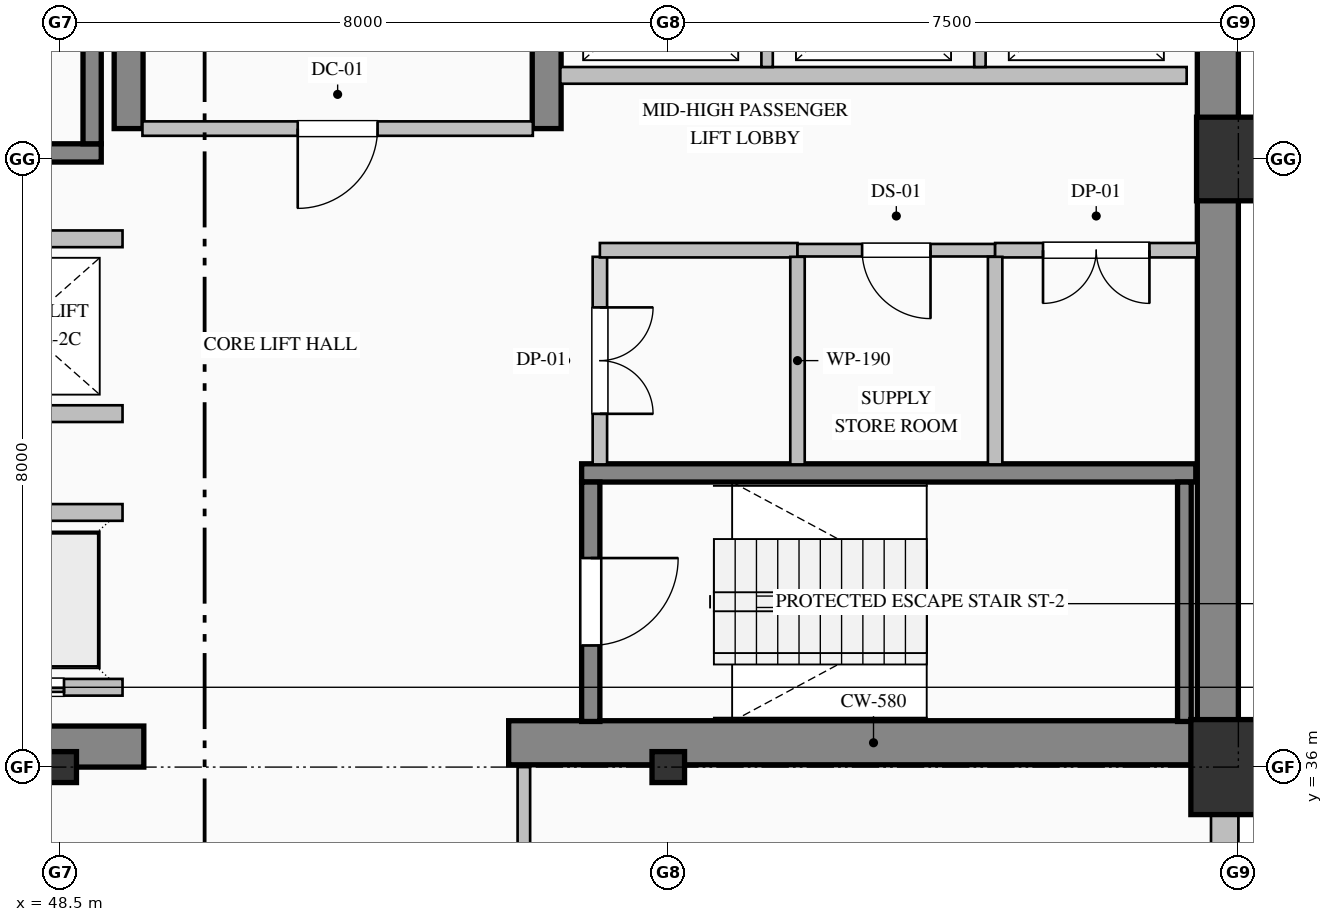
"""IFC4 building model, lengths in metres.
Left out: names, types, materials, properties, quantities, classifications, styles, units other than length and angle.
Written with IfcOpenShell. Run it as: python <this file> out.ifc"""

import sys

from ifc_helpers import new_model, si_unit, direction, frame, frame_2d, origin, origin_2d, place, context, subcontext, project, spatial, rectangle, hollow_rectangle, i_section, extrude, element, fill, save


model = new_model("IFC4")
c1 = context("Model", 3, precision=1e-05, world=origin(), true_north=direction((0.0, 1.0)))
c2 = subcontext(c1, "Body", "Model", "MODEL_VIEW")
j1 = project(units=[si_unit("LENGTHUNIT", "METRE"), si_unit("PLANEANGLEUNIT", "RADIAN")], contexts=[c1])
p1 = place(None, origin())
s1 = spatial("IfcSite", under=j1, at=p1, CompositionType="ELEMENT")
p2 = place(p1, origin())
s2 = spatial("IfcBuilding", under=s1, at=p2, CompositionType="ELEMENT")
p3 = place(p2, frame((0.0, 0.0, 92.2)))
s3 = spatial("IfcBuildingStorey", under=s2, at=p3, CompositionType="ELEMENT", Elevation=92.2)
p4 = place(p3, frame((63.73, 36.32, 0.0), z_axis=(0.0, 0.0, 1.0), x_axis=(0.0, 1.0, 0.0)))
e1 = element("IfcWall", 1, at=p4, inside=s3, PredefinedType="SHEAR", context=c2, shape_type="SweptSolid", body=[
    extrude(rectangle(XDim=15.14, YDim=0.54, at=frame_2d((7.57, 0.0))), origin(), (0.0, 0.0, 1.0), 3.75),
])
p5 = place(p3, frame((48.2, 36.27, 0.0), z_axis=(0.0, 0.0, 1.0), x_axis=(1.0, 0.0, 0.0)))
e2 = element("IfcWall", 2, at=p5, inside=s3, PredefinedType="SHEAR", context=c2, shape_type="SweptSolid", body=[
    extrude(rectangle(XDim=1.4, YDim=0.54, at=frame_2d((0.7, 0.0))), origin(), (0.0, 0.0, 1.0), 3.75),
])
p6 = place(p3, frame((54.4, 36.32, 0.0), z_axis=(0.0, 0.0, 1.0), x_axis=(1.0, 0.0, 0.0)))
e3 = element("IfcWall", 3, at=p6, inside=s3, PredefinedType="SHEAR", context=c2, shape_type="SweptSolid", body=[
    extrude(rectangle(XDim=9.6, YDim=0.58, at=frame_2d((4.8, 0.0))), origin(), (0.0, 0.0, 1.0), 4.0),
])
p7 = place(p3, frame((49.4, 44.4, 0.0), z_axis=(0.0, 0.0, 1.0), x_axis=(0.0, 1.0, 0.0)))
e4 = element("IfcWall", 4, at=p7, inside=s3, PredefinedType="SHEAR", context=c2, shape_type="SweptSolid", body=[
    extrude(rectangle(XDim=3.0, YDim=0.38, at=frame_2d((1.5, 0.0))), origin(), (0.0, 0.0, 1.0), 3.75),
])
p8 = place(p3, frame((54.9, 44.4, 0.0), z_axis=(0.0, 0.0, 1.0), x_axis=(0.0, 1.0, 0.0)))
e5 = element("IfcWall", 5, at=p8, inside=s3, PredefinedType="SHEAR", context=c2, shape_type="SweptSolid", body=[
    extrude(rectangle(XDim=7.06, YDim=0.38, at=frame_2d((3.53, 0.0))), origin(), (0.0, 0.0, 1.0), 3.75),
])
for number, where, z_axis, x_axis in (
    (6, (48.5, 36.0, 0.0), (0.0, 0.0, 1.0), (1.0, 0.0, 0.0)),
    (7, (56.5, 36.0, 0.0), (0.0, 0.0, 1.0), (1.0, 0.0, 0.0)),
):
    element("IfcColumn", number, at=place(p3, frame(where, z_axis=z_axis, x_axis=x_axis)), inside=s3, PredefinedType="COLUMN", context=c2, shape_type="SweptSolid", body=[
        extrude(i_section(OverallWidth=0.407, OverallDepth=0.428, WebThickness=0.02, FlangeThickness=0.035, FilletRadius=0.022, at=origin_2d()), origin(), (0.0, 0.0, 1.0), 4.0),
    ])
p9 = place(p3, frame((64.0, 36.0, 0.0), z_axis=(0.0, 0.0, 1.0), x_axis=(1.0, 0.0, 0.0)))
e8 = element("IfcColumn", 8, at=p9, inside=s3, PredefinedType="COLUMN", context=c2, shape_type="SweptSolid", body=[
    extrude(hollow_rectangle(XDim=1.25, YDim=1.25, WallThickness=0.045, at=origin_2d()), origin(), (0.0, 0.0, 1.0), 4.0),
])
p10 = place(p3, frame((64.0, 44.0, 0.0), z_axis=(0.0, 0.0, 1.0), x_axis=(1.0, 0.0, 0.0)))
e9 = element("IfcColumn", 9, at=p10, inside=s3, PredefinedType="COLUMN", context=c2, shape_type="SweptSolid", body=[
    extrude(hollow_rectangle(XDim=1.1, YDim=1.1, WallThickness=0.04, at=origin_2d()), origin(), (0.0, 0.0, 1.0), 4.0),
])
p11 = place(p3, frame((63.82, 36.05, 0.0), z_axis=(0.0, 0.0, 1.0), x_axis=(0.0, -1.0, 0.0)))
e10 = element("IfcWall", 10, at=p11, inside=s3, PredefinedType="SOLIDWALL", context=c2, shape_type="SweptSolid", body=[
    extrude(rectangle(XDim=28.05, YDim=0.36, at=frame_2d((14.025, 0.0))), origin(), (0.0, 0.0, 1.0), 3.25),
])
p12 = place(p11, frame((2.55, 0.0, 0.85)))
e11 = element("IfcOpeningElement", 11, at=p12, cuts=e10, PredefinedType="OPENING", context=c2, shape_type="SweptSolid", body=[
    extrude(rectangle(XDim=2.1, YDim=2.05, at=frame_2d((1.05, 1.025))), frame((0.0, 0.19, 0.0), z_axis=(0.0, -1.0, 0.0), x_axis=(1.0, 0.0, 0.0)), (0.0, 0.0, 1.0), 0.38),
])
p13 = place(p11, frame((13.35, 0.0, 0.85)))
e12 = element("IfcOpeningElement", 12, at=p13, cuts=e10, PredefinedType="OPENING", context=c2, shape_type="SweptSolid", body=[
    extrude(rectangle(XDim=2.1, YDim=2.05, at=frame_2d((1.05, 1.025))), frame((0.0, 0.19, 0.0), z_axis=(0.0, -1.0, 0.0), x_axis=(1.0, 0.0, 0.0)), (0.0, 0.0, 1.0), 0.38),
])
p14 = place(p3, frame((49.04, 44.08, 0.0), z_axis=(0.0, 0.0, 1.0), x_axis=(-1.0, 0.0, 0.0)))
e13 = element("IfcWall", 13, at=p14, inside=s3, PredefinedType="SOLIDWALL", context=c2, shape_type="SweptSolid", body=[
    extrude(rectangle(XDim=8.08, YDim=0.24, at=frame_2d((4.04, 0.0))), origin(), (0.0, 0.0, 1.0), 4.0),
])
p15 = place(p3, frame((48.92, 44.2, 0.0), z_axis=(0.0, 0.0, 1.0), x_axis=(0.0, 1.0, 0.0)))
e14 = element("IfcWall", 14, at=p15, inside=s3, PredefinedType="SOLIDWALL", context=c2, shape_type="SweptSolid", body=[
    extrude(rectangle(XDim=3.15, YDim=0.24, at=frame_2d((1.575, 0.0))), origin(), (0.0, 0.0, 1.0), 4.0),
])
p16 = place(p3, frame((55.36, 39.87, 0.0), z_axis=(0.0, 0.0, 1.0), x_axis=(1.0, 0.0, 0.0)))
e15 = element("IfcWall", 15, at=p16, inside=s3, PredefinedType="SOLIDWALL", context=c2, shape_type="SweptSolid", body=[
    extrude(rectangle(XDim=8.08, YDim=0.24, at=frame_2d((4.04, 0.0))), origin(), (0.0, 0.0, 1.0), 4.0),
])
p17 = place(p3, frame((55.48, 39.75, 0.0), z_axis=(0.0, 0.0, 1.0), x_axis=(0.0, -1.0, 0.0)))
e16 = element("IfcWall", 16, at=p17, inside=s3, PredefinedType="SOLIDWALL", context=c2, shape_type="SweptSolid", body=[
    extrude(rectangle(XDim=3.15, YDim=0.24, at=frame_2d((1.575, 0.0))), origin(), (0.0, 0.0, 1.0), 4.0),
])
p18 = place(p17, frame((1.0, 0.0, 0.0)))
e17 = element("IfcOpeningElement", 17, at=p18, cuts=e16, PredefinedType="OPENING", context=c2, shape_type="SweptSolid", body=[
    extrude(rectangle(XDim=1.15, YDim=2.2, at=frame_2d((0.575, 1.1))), frame((0.0, 0.13, 0.0), z_axis=(0.0, -1.0, 0.0), x_axis=(1.0, 0.0, 0.0)), (0.0, 0.0, 1.0), 0.26),
])
p19 = place(p3, frame((63.29, 36.6, 0.0), z_axis=(0.0, 0.0, 1.0), x_axis=(0.0, 1.0, 0.0)))
e18 = element("IfcWall", 18, at=p19, inside=s3, PredefinedType="SOLIDWALL", context=c2, shape_type="SweptSolid", body=[
    extrude(rectangle(XDim=3.15, YDim=0.18, at=frame_2d((1.575, 0.0))), origin(), (0.0, 0.0, 1.0), 4.0),
])
p20 = place(p3, frame((49.32, 37.05, 0.0), z_axis=(0.0, 0.0, 1.0), x_axis=(-1.0, 0.0, 0.0)))
e19 = element("IfcWall", 19, at=p20, inside=s3, PredefinedType="PARTITIONING", context=c2, shape_type="SweptSolid", body=[
    extrude(rectangle(XDim=8.24, YDim=0.22, at=frame_2d((4.12, 0.0))), origin(), (0.0, 0.0, 1.0), 3.75),
])
p21 = place(p20, frame((6.37, 0.0, 0.0)))
e20 = element("IfcOpeningElement", 20, at=p21, cuts=e19, PredefinedType="OPENING", context=c2, shape_type="SweptSolid", body=[
    extrude(rectangle(XDim=1.1, YDim=2.2, at=frame_2d((0.55, 1.1))), frame((0.0, 0.12, 0.0), z_axis=(0.0, -1.0, 0.0), x_axis=(1.0, 0.0, 0.0)), (0.0, 0.0, 1.0), 0.24),
])
p22 = place(p20, frame((3.57, 0.0, 0.0)))
e21 = element("IfcOpeningElement", 21, at=p22, cuts=e19, PredefinedType="OPENING", context=c2, shape_type="SweptSolid", body=[
    extrude(rectangle(XDim=1.1, YDim=2.2, at=frame_2d((0.55, 1.1))), frame((0.0, 0.12, 0.0), z_axis=(0.0, -1.0, 0.0), x_axis=(1.0, 0.0, 0.0)), (0.0, 0.0, 1.0), 0.24),
])
p23 = place(p20, frame((0.77, 0.0, 0.0)))
e22 = element("IfcOpeningElement", 22, at=p23, cuts=e19, PredefinedType="OPENING", context=c2, shape_type="SweptSolid", body=[
    extrude(rectangle(XDim=1.1, YDim=2.2, at=frame_2d((0.55, 1.1))), frame((0.0, 0.12, 0.0), z_axis=(0.0, -1.0, 0.0), x_axis=(1.0, 0.0, 0.0)), (0.0, 0.0, 1.0), 0.24),
])
for number, where, z_axis, x_axis in (
    (23, (41.08, 39.35, 0.0), (0.0, 0.0, 1.0), (1.0, 0.0, 0.0)),
    (24, (49.32, 40.65, 0.0), (0.0, 0.0, 1.0), (-1.0, 0.0, 0.0)),
    (25, (41.08, 42.95, 0.0), (0.0, 0.0, 1.0), (1.0, 0.0, 0.0)),
    (26, (63.32, 45.1, 0.0), (0.0, 0.0, 1.0), (-1.0, 0.0, 0.0)),
):
    element("IfcWall", number, at=place(p3, frame(where, z_axis=z_axis, x_axis=x_axis)), inside=s3, PredefinedType="PARTITIONING", context=c2, shape_type="SweptSolid", body=[
        extrude(rectangle(XDim=8.24, YDim=0.22, at=frame_2d((4.12, 0.0))), origin(), (0.0, 0.0, 1.0), 3.75),
    ])
for number, where, z_axis, x_axis in (
    (27, (57.8, 45.21, 0.0), (0.0, 0.0, 1.0), (0.0, 1.0, 0.0)),
    (28, (60.6, 45.21, 0.0), (0.0, 0.0, 1.0), (0.0, 1.0, 0.0)),
):
    element("IfcWall", number, at=place(p3, frame(where, z_axis=z_axis, x_axis=x_axis)), inside=s3, PredefinedType="PARTITIONING", context=c2, shape_type="SweptSolid", body=[
        extrude(rectangle(XDim=2.03, YDim=0.15, at=frame_2d((1.015, 0.0))), origin(), (0.0, 0.0, 1.0), 3.75),
    ])
p24 = place(p3, frame((54.718, 44.4, 0.0), z_axis=(0.0, 0.0, 1.0), x_axis=(-1.0, 0.0, 0.0)))
e29 = element("IfcWall", 29, at=p24, inside=s3, PredefinedType="PARTITIONING", context=c2, shape_type="SweptSolid", body=[
    extrude(rectangle(XDim=5.136, YDim=0.19, at=frame_2d((2.568, 0.0))), origin(), (0.0, 0.0, 1.0), 3.75),
])
p25 = place(p24, frame((2.043, 0.0, 0.0)))
e30 = element("IfcOpeningElement", 30, at=p25, cuts=e29, PredefinedType="OPENING", context=c2, shape_type="SweptSolid", body=[
    extrude(rectangle(XDim=1.05, YDim=2.15, at=frame_2d((0.525, 1.075))), frame((0.0, 0.105, 0.0), z_axis=(0.0, -1.0, 0.0), x_axis=(1.0, 0.0, 0.0)), (0.0, 0.0, 1.0), 0.21),
])
p26 = place(p3, frame((55.6, 42.713, 0.0), z_axis=(0.0, 0.0, 1.0), x_axis=(0.0, -1.0, 0.0)))
e31 = element("IfcWall", 31, at=p26, inside=s3, PredefinedType="PARTITIONING", context=c2, shape_type="SweptSolid", body=[
    extrude(rectangle(XDim=2.731, YDim=0.19, at=frame_2d((1.365, 0.0))), origin(), (0.0, 0.0, 1.0), 3.75),
])
p27 = place(p26, frame((0.666, 0.0, 0.0)))
e32 = element("IfcOpeningElement", 32, at=p27, cuts=e31, PredefinedType="OPENING", context=c2, shape_type="SweptSolid", body=[
    extrude(rectangle(XDim=1.4, YDim=2.25, at=frame_2d((0.7, 1.125))), frame((0.0, 0.105, 0.0), z_axis=(0.0, -1.0, 0.0), x_axis=(1.0, 0.0, 0.0)), (0.0, 0.0, 1.0), 0.21),
])
p28 = place(p3, frame((58.2, 42.8, 0.0), z_axis=(0.0, 0.0, 1.0), x_axis=(-1.0, 0.0, 0.0)))
e33 = element("IfcWall", 33, at=p28, inside=s3, PredefinedType="PARTITIONING", context=c2, shape_type="SweptSolid", body=[
    extrude(rectangle(XDim=2.6, YDim=0.19, at=frame_2d((1.3, 0.0))), origin(), (0.0, 0.0, 1.0), 3.75),
])
p29 = place(p3, frame((60.8, 42.8, 0.0), z_axis=(0.0, 0.0, 1.0), x_axis=(-1.0, 0.0, 0.0)))
e34 = element("IfcWall", 34, at=p29, inside=s3, PredefinedType="PARTITIONING", context=c2, shape_type="SweptSolid", body=[
    extrude(rectangle(XDim=2.6, YDim=0.165, at=frame_2d((1.3, 0.0))), origin(), (0.0, 0.0, 1.0), 3.75),
])
p30 = place(p29, frame((0.85, 0.0, 0.0)))
e35 = element("IfcOpeningElement", 35, at=p30, cuts=e34, PredefinedType="OPENING", context=c2, shape_type="SweptSolid", body=[
    extrude(rectangle(XDim=0.9, YDim=2.15, at=frame_2d((0.45, 1.075))), frame((0.0, 0.093, 0.0), z_axis=(0.0, -1.0, 0.0), x_axis=(1.0, 0.0, 0.0)), (0.0, 0.0, 1.0), 0.185),
])
p31 = place(p3, frame((63.46, 42.8, 0.0), z_axis=(0.0, 0.0, 1.0), x_axis=(-1.0, 0.0, 0.0)))
e36 = element("IfcWall", 36, at=p31, inside=s3, PredefinedType="PARTITIONING", context=c2, shape_type="SweptSolid", body=[
    extrude(rectangle(XDim=2.66, YDim=0.19, at=frame_2d((1.33, 0.0))), origin(), (0.0, 0.0, 1.0), 3.75),
])
p32 = place(p31, frame((0.63, 0.0, 0.0)))
e37 = element("IfcOpeningElement", 37, at=p32, cuts=e36, PredefinedType="OPENING", context=c2, shape_type="SweptSolid", body=[
    extrude(rectangle(XDim=1.4, YDim=2.25, at=frame_2d((0.7, 1.125))), frame((0.0, 0.105, 0.0), z_axis=(0.0, -1.0, 0.0), x_axis=(1.0, 0.0, 0.0)), (0.0, 0.0, 1.0), 0.21),
])
for number, where, z_axis, x_axis in (
    (38, (58.2, 42.713, 0.0), (0.0, 0.0, 1.0), (0.0, -1.0, 0.0)),
    (39, (60.8, 42.713, 0.0), (0.0, 0.0, 1.0), (0.0, -1.0, 0.0)),
):
    element("IfcWall", number, at=place(p3, frame(where, z_axis=z_axis, x_axis=x_axis)), inside=s3, PredefinedType="PARTITIONING", context=c2, shape_type="SweptSolid", body=[
        extrude(rectangle(XDim=2.731, YDim=0.19, at=frame_2d((1.365, 0.0))), origin(), (0.0, 0.0, 1.0), 3.75),
    ])
p33 = place(p3, frame((54.6, 36.0, 0.0), z_axis=(0.0, 0.0, 1.0), x_axis=(0.0, -1.0, 0.0)))
e40 = element("IfcWall", 40, at=p33, inside=s3, PredefinedType="PARTITIONING", context=c2, shape_type="SweptSolid", body=[
    extrude(rectangle(XDim=2.125, YDim=0.165, at=frame_2d((1.063, 0.0))), origin(), (0.0, 0.0, 1.0), 3.75),
])
p34 = place(p18, origin())
e41 = element("IfcDoor", 41, at=p34, inside=s3, OperationType="SINGLE_SWING_LEFT", PredefinedType="DOOR", context=c2, shape_type="SweptSolid", body=[
    extrude(rectangle(XDim=1.15, YDim=2.2, at=frame_2d((0.575, 1.1))), frame((0.0, 0.025, 0.0), z_axis=(0.0, -1.0, 0.0), x_axis=(1.0, 0.0, 0.0)), (0.0, 0.0, 1.0), 0.05),
])
fill(e17, e41)
p35 = place(p23, origin())
e42 = element("IfcDoor", 42, at=p35, inside=s3, OperationType="DOUBLE_DOOR_SLIDING", PredefinedType="DOOR", context=c2, shape_type="SweptSolid", body=[
    extrude(rectangle(XDim=1.1, YDim=2.2, at=frame_2d((0.55, 1.1))), frame((0.0, 0.025, 0.0), z_axis=(0.0, -1.0, 0.0), x_axis=(1.0, 0.0, 0.0)), (0.0, 0.0, 1.0), 0.05),
])
fill(e22, e42)
p36 = place(p25, origin())
e43 = element("IfcDoor", 43, at=p36, inside=s3, OperationType="SINGLE_SWING_RIGHT", PredefinedType="DOOR", context=c2, shape_type="SweptSolid", body=[
    extrude(rectangle(XDim=1.05, YDim=2.15, at=frame_2d((0.525, 1.075))), frame((0.0, 0.025, 0.0), z_axis=(0.0, -1.0, 0.0), x_axis=(1.0, 0.0, 0.0)), (0.0, 0.0, 1.0), 0.05),
])
fill(e30, e43)
p37 = place(p27, origin())
e44 = element("IfcDoor", 44, at=p37, inside=s3, OperationType="DOUBLE_DOOR_SINGLE_SWING", PredefinedType="DOOR", context=c2, shape_type="SweptSolid", body=[
    extrude(rectangle(XDim=1.4, YDim=2.25, at=frame_2d((0.7, 1.125))), frame((0.0, 0.025, 0.0), z_axis=(0.0, -1.0, 0.0), x_axis=(1.0, 0.0, 0.0)), (0.0, 0.0, 1.0), 0.05),
])
fill(e32, e44)
p38 = place(p30, origin())
e45 = element("IfcDoor", 45, at=p38, inside=s3, OperationType="SINGLE_SWING_LEFT", PredefinedType="DOOR", context=c2, shape_type="SweptSolid", body=[
    extrude(rectangle(XDim=0.9, YDim=2.15, at=frame_2d((0.45, 1.075))), frame((0.0, 0.025, 0.0), z_axis=(0.0, -1.0, 0.0), x_axis=(1.0, 0.0, 0.0)), (0.0, 0.0, 1.0), 0.05),
])
fill(e35, e45)
p39 = place(p32, origin())
e46 = element("IfcDoor", 46, at=p39, inside=s3, OperationType="DOUBLE_DOOR_SINGLE_SWING", PredefinedType="DOOR", context=c2, shape_type="SweptSolid", body=[
    extrude(rectangle(XDim=1.4, YDim=2.25, at=frame_2d((0.7, 1.125))), frame((0.0, 0.025, 0.0), z_axis=(0.0, -1.0, 0.0), x_axis=(1.0, 0.0, 0.0)), (0.0, 0.0, 1.0), 0.05),
])
fill(e37, e46)
save(model, sys.argv[1])
